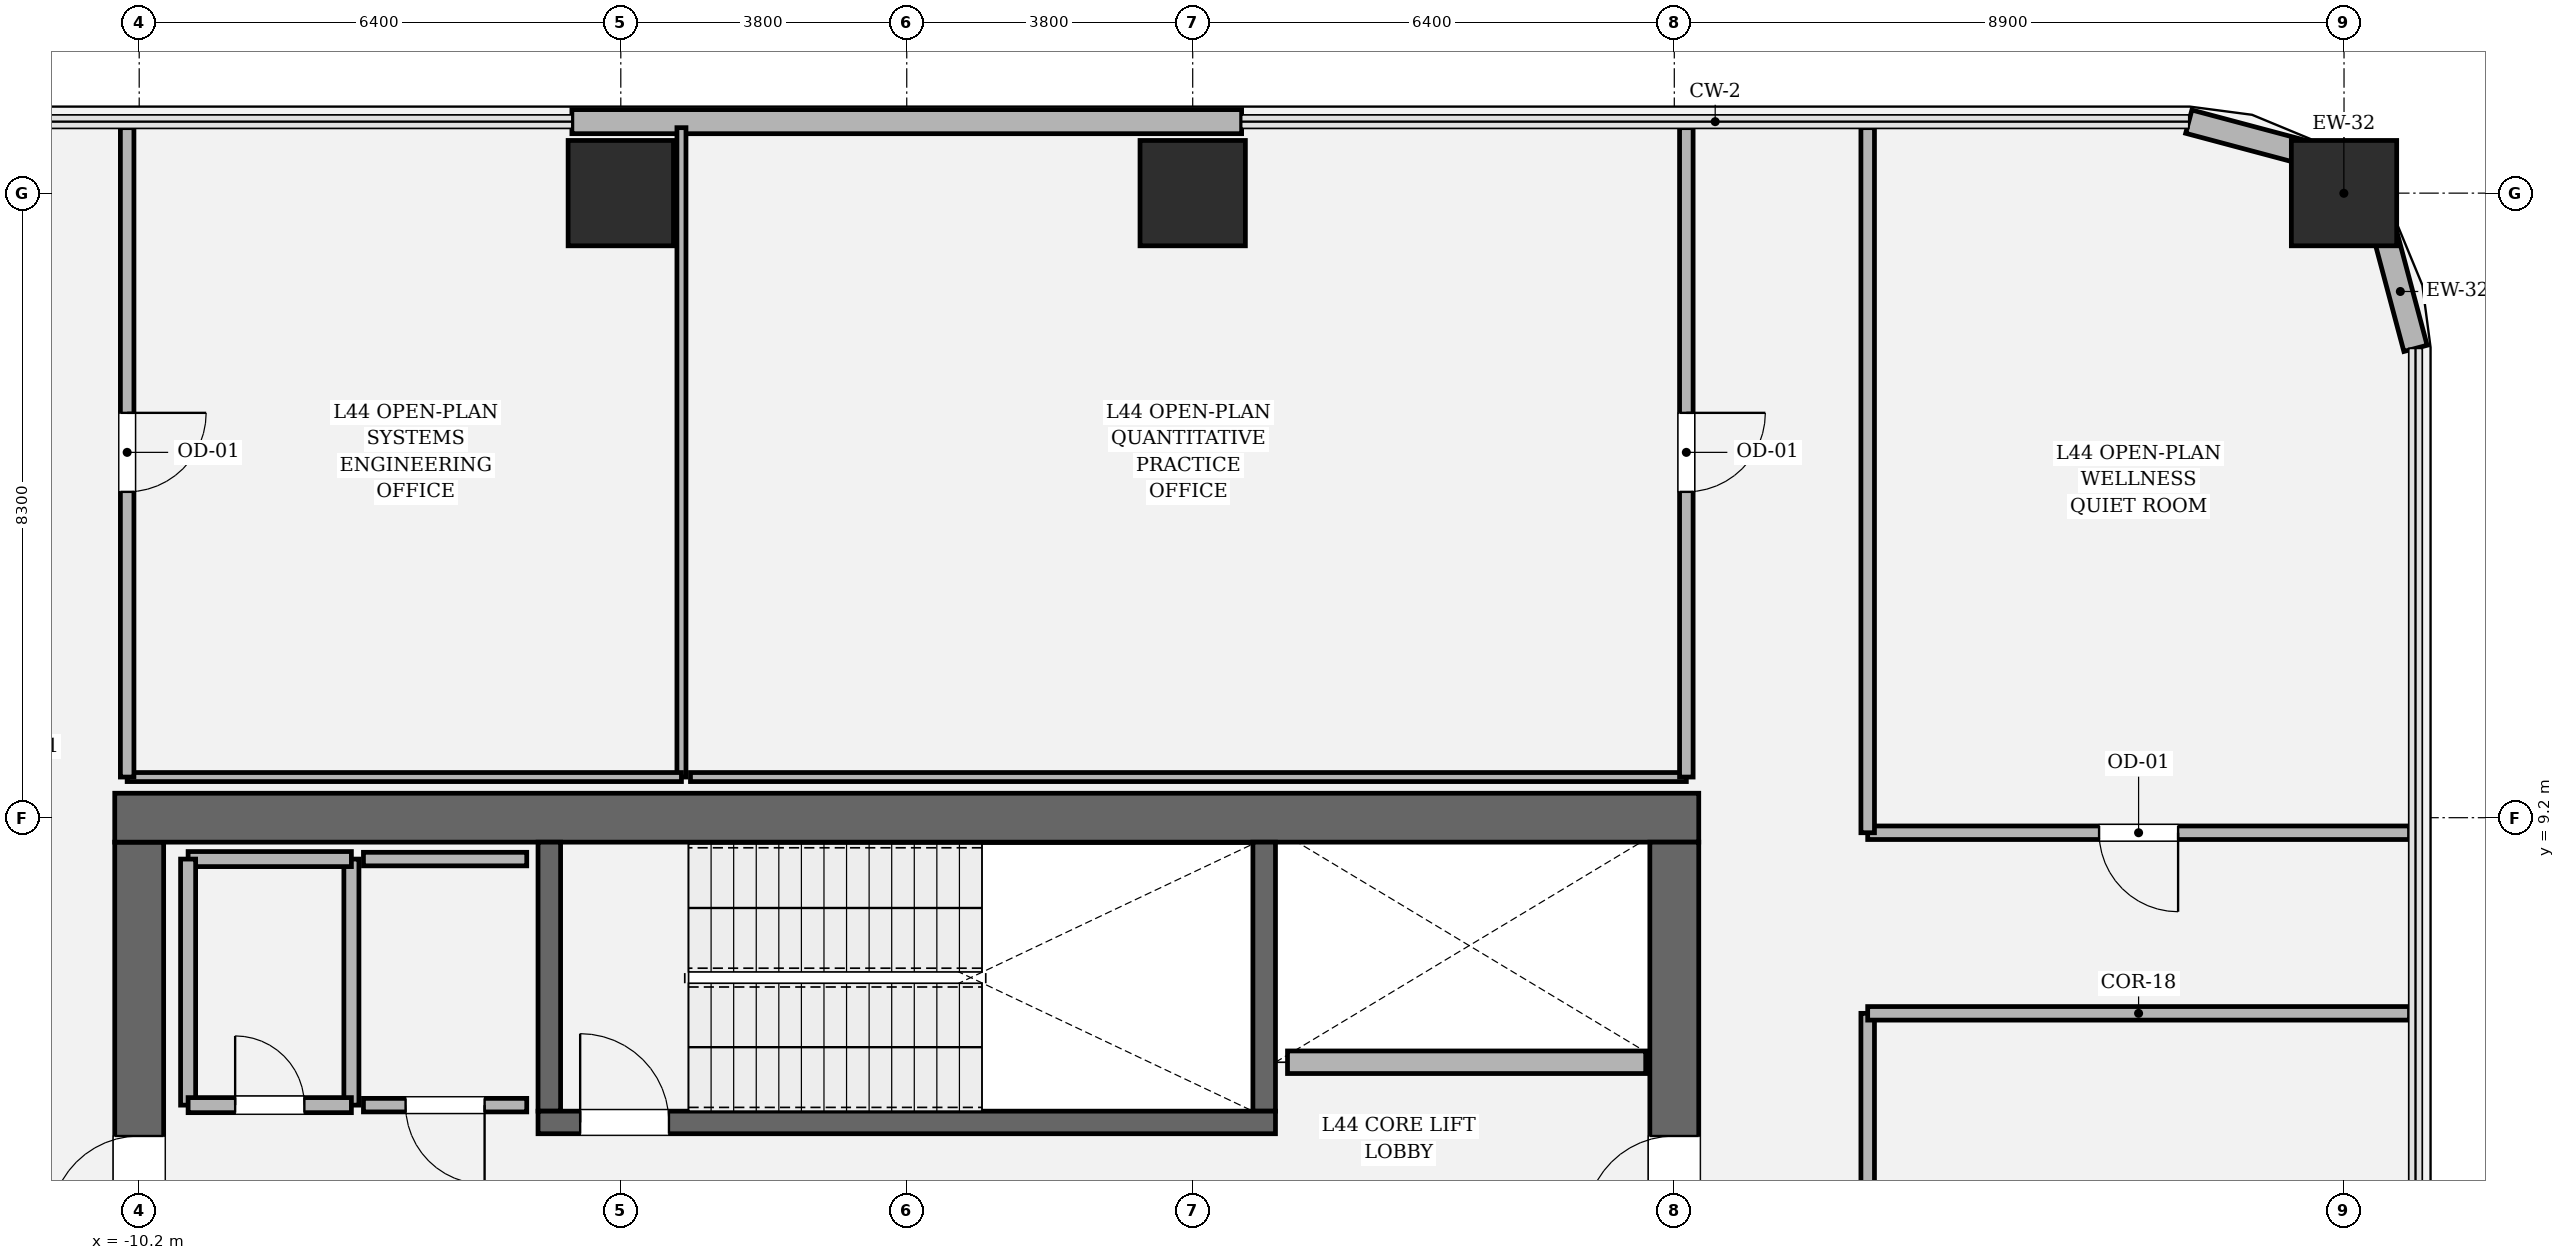
"""IFC4 building model, lengths in metres.
Left out: names, types, materials, properties, quantities, classifications, styles, units other than length and angle.
Written with IfcOpenShell. Run it as: python <this file> out.ifc"""

import sys

from ifc_helpers import new_model, si_unit, direction, frame, frame_2d, origin, origin_2d, place, context, subcontext, project, spatial, rectangle, hollow_rectangle, extrude, element, fill, save


model = new_model("IFC4")
c1 = context("Model", 3, precision=1e-05, world=origin(), true_north=direction((0.0, 1.0)))
c2 = subcontext(c1, "Body", "Model", "MODEL_VIEW")
j1 = project(units=[si_unit("LENGTHUNIT", "METRE"), si_unit("PLANEANGLEUNIT", "RADIAN")], contexts=[c1])
p1 = place(None, origin())
s1 = spatial("IfcSite", under=j1, at=p1, CompositionType="ELEMENT")
p2 = place(p1, origin())
s2 = spatial("IfcBuilding", under=s1, at=p2, CompositionType="ELEMENT")
p3 = place(p2, frame((0.0, 0.0, 188.4)))
s3 = spatial("IfcBuildingStorey", under=s2, at=p3, CompositionType="ELEMENT", Elevation=188.4)
p4 = place(p3, frame((-10.2, -8.875, 0.0), z_axis=(0.0, 0.0, 1.0), x_axis=(0.0, 1.0, 0.0)))
e1 = element("IfcWall", 1, at=p4, inside=s3, PredefinedType="SHEAR", context=c2, shape_type="SweptSolid", body=[
    extrude(rectangle(XDim=17.75, YDim=0.65, at=frame_2d((8.875, 0.0))), origin(), (0.0, 0.0, 1.0), 4.05),
])
p5 = place(p4, frame((12.665, 0.0, 0.0)))
e2 = element("IfcOpeningElement", 2, at=p5, cuts=e1, PredefinedType="OPENING", context=c2, shape_type="SweptSolid", body=[
    extrude(rectangle(XDim=1.18, YDim=2.2, at=frame_2d((0.59, 1.1))), frame((0.0, 0.335, 0.0), z_axis=(0.0, -1.0, 0.0), x_axis=(1.0, 0.0, 0.0)), (0.0, 0.0, 1.0), 0.67),
])
p6 = place(p3, frame((-10.525, 9.2, 0.0), z_axis=(0.0, 0.0, 1.0), x_axis=(1.0, 0.0, 0.0)))
e3 = element("IfcWall", 3, at=p6, inside=s3, PredefinedType="SHEAR", context=c2, shape_type="SweptSolid", body=[
    extrude(rectangle(XDim=21.05, YDim=0.65, at=frame_2d((10.525, 0.0))), origin(), (0.0, 0.0, 1.0), 4.05),
])
p7 = place(p3, frame((10.2, 8.875, 0.0), z_axis=(0.0, 0.0, 1.0), x_axis=(0.0, -1.0, 0.0)))
e4 = element("IfcWall", 4, at=p7, inside=s3, PredefinedType="SHEAR", context=c2, shape_type="SweptSolid", body=[
    extrude(rectangle(XDim=17.75, YDim=0.65, at=frame_2d((8.875, 0.0))), origin(), (0.0, 0.0, 1.0), 4.05),
])
p8 = place(p7, frame((3.905, 0.0, 0.0)))
e5 = element("IfcOpeningElement", 5, at=p8, cuts=e4, PredefinedType="OPENING", context=c2, shape_type="SweptSolid", body=[
    extrude(rectangle(XDim=1.18, YDim=2.2, at=frame_2d((0.59, 1.1))), frame((0.0, 0.335, 0.0), z_axis=(0.0, -1.0, 0.0), x_axis=(1.0, 0.0, 0.0)), (0.0, 0.0, 1.0), 0.67),
])
for number, where, z_axis, x_axis in (
    (6, (-4.75, 5.3, 0.0), (0.0, 0.0, 1.0), (0.0, 1.0, 0.0)),
    (7, (4.75, 8.875, 0.0), (0.0, 0.0, 1.0), (0.0, -1.0, 0.0)),
):
    element("IfcWall", number, at=place(p3, frame(where, z_axis=z_axis, x_axis=x_axis)), inside=s3, PredefinedType="SOLIDWALL", context=c2, shape_type="SweptSolid", body=[
        extrude(rectangle(XDim=3.575, YDim=0.3, at=frame_2d((1.788, 0.0))), origin(), (0.0, 0.0, 1.0), 4.05),
    ])
p9 = place(p3, frame((-4.9, 5.15, 0.0), z_axis=(0.0, 0.0, 1.0), x_axis=(1.0, 0.0, 0.0)))
e8 = element("IfcWall", 8, at=p9, inside=s3, PredefinedType="SOLIDWALL", context=c2, shape_type="SweptSolid", body=[
    extrude(rectangle(XDim=9.8, YDim=0.3, at=frame_2d((4.9, 0.0))), origin(), (0.0, 0.0, 1.0), 4.05),
])
p10 = place(p9, frame((0.56, 0.0, 0.0)))
e9 = element("IfcOpeningElement", 9, at=p10, cuts=e8, PredefinedType="OPENING", context=c2, shape_type="SweptSolid", body=[
    extrude(rectangle(XDim=1.18, YDim=2.2, at=frame_2d((0.59, 1.1))), frame((0.0, 0.16, 0.0), z_axis=(0.0, -1.0, 0.0), x_axis=(1.0, 0.0, 0.0)), (0.0, 0.0, 1.0), 0.32),
])
for number, where, z_axis, x_axis in (
    (10, (19.1, 17.5, 0.0), (0.0, 0.0, 1.0), (1.0, 0.0, 0.0)),
    (11, (3.8, 17.5, 0.0), (0.0, 0.0, 1.0), (1.0, 0.0, 0.0)),
    (12, (-3.8, 17.5, 0.0), (0.0, 0.0, 1.0), (1.0, 0.0, 0.0)),
):
    element("IfcColumn", number, at=place(p3, frame(where, z_axis=z_axis, x_axis=x_axis)), inside=s3, PredefinedType="COLUMN", context=c2, shape_type="SweptSolid", body=[
        extrude(hollow_rectangle(XDim=1.4, YDim=1.4, WallThickness=0.042, at=origin_2d()), origin(), (0.0, 0.0, 1.0), 4.05),
    ])
p11 = place(p3, frame((20.05, 15.437, 0.0), z_axis=(0.0, 0.0, 1.0), x_axis=(-0.257847112249, 0.966185730957, 0.0)))
e13 = element("IfcWall", 13, at=p11, inside=s3, PredefinedType="SOLIDWALL", context=c2, shape_type="SweptSolid", body=[
    extrude(rectangle(XDim=1.565, YDim=0.32, at=frame_2d((0.783, 0.0))), origin(), (0.0, 0.0, 1.0), 3.83),
])
p12 = place(p3, frame((19.646, 16.949, 0.0), z_axis=(0.0, 0.0, 1.0), x_axis=(-0.707106781187, 0.707106781187, 0.0)))
e14 = element("IfcWall", 14, at=p12, inside=s3, PredefinedType="SOLIDWALL", context=c2, shape_type="SweptSolid", body=[
    extrude(rectangle(XDim=1.552, YDim=0.32, at=frame_2d((0.776, 0.0))), origin(), (0.0, 0.0, 1.0), 3.174),
])
p13 = place(p3, frame((18.549, 18.047, 0.0), z_axis=(0.0, 0.0, 1.0), x_axis=(-0.966224582397, 0.257701486942, 0.0)))
e15 = element("IfcWall", 15, at=p13, inside=s3, PredefinedType="SOLIDWALL", context=c2, shape_type="SweptSolid", body=[
    extrude(rectangle(XDim=1.565, YDim=0.32, at=frame_2d((0.783, 0.0))), origin(), (0.0, 0.0, 1.0), 3.83),
])
p14 = place(p3, frame((4.45, 18.45, 0.0), z_axis=(0.0, 0.0, 1.0), x_axis=(-1.0, 0.0, 0.0)))
e16 = element("IfcWall", 16, at=p14, inside=s3, PredefinedType="SOLIDWALL", context=c2, shape_type="SweptSolid", body=[
    extrude(rectangle(XDim=8.9, YDim=0.32, at=frame_2d((4.45, 0.0))), origin(), (0.0, 0.0, 1.0), 3.83),
])
p15 = place(p3, frame((5.06, 5.95, 0.0), z_axis=(0.0, 0.0, 1.0), x_axis=(1.0, 0.0, 0.0)))
e17 = element("IfcWall", 17, at=p15, inside=s3, PredefinedType="SOLIDWALL", context=c2, shape_type="SweptSolid", body=[
    extrude(rectangle(XDim=4.76, YDim=0.3, at=frame_2d((2.38, 0.0))), origin(), (0.0, 0.0, 1.0), 3.83),
])
p16 = place(p3, frame((-7.38, 5.38, 0.0), z_axis=(0.0, 0.0, 1.0), x_axis=(0.0, 1.0, 0.0)))
e18 = element("IfcWall", 18, at=p16, inside=s3, PredefinedType="SOLIDWALL", context=c2, shape_type="SweptSolid", body=[
    extrude(rectangle(XDim=3.27, YDim=0.2, at=frame_2d((1.635, 0.0))), origin(), (0.0, 0.0, 1.0), 3.83),
])
p17 = place(p3, frame((-7.38, 8.65, 0.0), z_axis=(0.0, 0.0, 1.0), x_axis=(-1.0, 0.0, 0.0)))
e19 = element("IfcWall", 19, at=p17, inside=s3, PredefinedType="SOLIDWALL", context=c2, shape_type="SweptSolid", body=[
    extrude(rectangle(XDim=2.17, YDim=0.2, at=frame_2d((1.085, 0.0))), origin(), (0.0, 0.0, 1.0), 3.83),
])
p18 = place(p3, frame((-9.55, 8.65, 0.0), z_axis=(0.0, 0.0, 1.0), x_axis=(0.0, -1.0, 0.0)))
e20 = element("IfcWall", 20, at=p18, inside=s3, PredefinedType="SOLIDWALL", context=c2, shape_type="SweptSolid", body=[
    extrude(rectangle(XDim=3.27, YDim=0.2, at=frame_2d((1.635, 0.0))), origin(), (0.0, 0.0, 1.0), 3.83),
])
p19 = place(p3, frame((-9.55, 5.38, 0.0), z_axis=(0.0, 0.0, 1.0), x_axis=(1.0, 0.0, 0.0)))
e21 = element("IfcWall", 21, at=p19, inside=s3, PredefinedType="SOLIDWALL", context=c2, shape_type="SweptSolid", body=[
    extrude(rectangle(XDim=2.17, YDim=0.2, at=frame_2d((1.085, 0.0))), origin(), (0.0, 0.0, 1.0), 3.83),
])
p20 = place(p19, frame((0.625, 0.0, 0.0)))
e22 = element("IfcOpeningElement", 22, at=p20, cuts=e21, PredefinedType="OPENING", context=c2, shape_type="SweptSolid", body=[
    extrude(rectangle(XDim=0.92, YDim=2.1, at=frame_2d((0.46, 1.05))), frame((0.0, 0.11, 0.0), z_axis=(0.0, -1.0, 0.0), x_axis=(1.0, 0.0, 0.0)), (0.0, 0.0, 1.0), 0.22),
])
p21 = place(p3, frame((-5.05, 8.65, 0.0), z_axis=(0.0, 0.0, 1.0), x_axis=(-1.0, 0.0, 0.0)))
e23 = element("IfcWall", 23, at=p21, inside=s3, PredefinedType="PARTITIONING", context=c2, shape_type="SweptSolid", body=[
    extrude(rectangle(XDim=2.17, YDim=0.18, at=frame_2d((1.085, 0.0))), origin(), (0.0, 0.0, 1.0), 3.83),
])
p22 = place(p3, frame((-7.22, 5.38, 0.0), z_axis=(0.0, 0.0, 1.0), x_axis=(1.0, 0.0, 0.0)))
e24 = element("IfcWall", 24, at=p22, inside=s3, PredefinedType="PARTITIONING", context=c2, shape_type="SweptSolid", body=[
    extrude(rectangle(XDim=2.17, YDim=0.18, at=frame_2d((1.085, 0.0))), origin(), (0.0, 0.0, 1.0), 3.83),
])
p23 = place(p22, frame((0.56, 0.0, 0.0)))
e25 = element("IfcOpeningElement", 25, at=p23, cuts=e24, PredefinedType="OPENING", context=c2, shape_type="SweptSolid", body=[
    extrude(rectangle(XDim=1.05, YDim=2.2, at=frame_2d((0.525, 1.1))), frame((0.0, 0.1, 0.0), z_axis=(0.0, -1.0, 0.0), x_axis=(1.0, 0.0, 0.0)), (0.0, 0.0, 1.0), 0.2),
])
p24 = place(p3, frame((12.77, -11.77, 0.0), z_axis=(0.0, 0.0, 1.0), x_axis=(0.0, 1.0, 0.0)))
e26 = element("IfcWall", 26, at=p24, inside=s3, PredefinedType="PARTITIONING", context=c2, shape_type="SweptSolid", body=[
    extrude(rectangle(XDim=18.37, YDim=0.18, at=frame_2d((9.185, 0.0))), origin(), (0.0, 0.0, 1.0), 3.174),
])
p25 = place(p24, frame((8.485, 0.0, 0.0)))
e27 = element("IfcOpeningElement", 27, at=p25, cuts=e26, PredefinedType="OPENING", context=c2, shape_type="SweptSolid", body=[
    extrude(rectangle(XDim=1.4, YDim=2.25, at=frame_2d((0.7, 1.125))), frame((0.0, 0.1, 0.0), z_axis=(0.0, -1.0, 0.0), x_axis=(1.0, 0.0, 0.0)), (0.0, 0.0, 1.0), 0.2),
])
p26 = place(p3, frame((12.77, 6.6, 0.0), z_axis=(0.0, 0.0, 1.0), x_axis=(1.0, 0.0, 0.0)))
e28 = element("IfcWall", 28, at=p26, inside=s3, PredefinedType="PARTITIONING", context=c2, shape_type="SweptSolid", body=[
    extrude(rectangle(XDim=7.2, YDim=0.18, at=frame_2d((3.6, 0.0))), origin(), (0.0, 0.0, 1.0), 3.174),
])
p27 = place(p3, frame((19.97, 9.0, 0.0), z_axis=(0.0, 0.0, 1.0), x_axis=(-1.0, 0.0, 0.0)))
e29 = element("IfcWall", 29, at=p27, inside=s3, PredefinedType="PARTITIONING", context=c2, shape_type="SweptSolid", body=[
    extrude(rectangle(XDim=7.2, YDim=0.18, at=frame_2d((3.6, 0.0))), origin(), (0.0, 0.0, 1.0), 3.174),
])
p28 = place(p27, frame((3.075, 0.0, 0.0)))
e30 = element("IfcOpeningElement", 30, at=p28, cuts=e29, PredefinedType="OPENING", context=c2, shape_type="SweptSolid", body=[
    extrude(rectangle(XDim=1.05, YDim=2.2, at=frame_2d((0.525, 1.1))), frame((0.0, 0.1, 0.0), z_axis=(0.0, -1.0, 0.0), x_axis=(1.0, 0.0, 0.0)), (0.0, 0.0, 1.0), 0.2),
])
p29 = place(p3, frame((12.77, 9.0, 0.0), z_axis=(0.0, 0.0, 1.0), x_axis=(0.0, 1.0, 0.0)))
e31 = element("IfcWall", 31, at=p29, inside=s3, PredefinedType="PARTITIONING", context=c2, shape_type="SweptSolid", body=[
    extrude(rectangle(XDim=9.37, YDim=0.18, at=frame_2d((4.685, 0.0))), origin(), (0.0, 0.0, 1.0), 3.174),
])
p30 = place(p3, frame((-2.994, 18.37, 0.0), z_axis=(0.0, 0.0, 1.0), x_axis=(0.0, -1.0, 0.0)))
e32 = element("IfcWall", 32, at=p30, inside=s3, PredefinedType="PARTITIONING", context=c2, shape_type="SweptSolid", body=[
    extrude(rectangle(XDim=8.63, YDim=0.12, at=frame_2d((4.315, 0.0))), origin(), (0.0, 0.0, 1.0), 3.174),
])
p31 = place(p3, frame((-2.994, 9.74, 0.0), z_axis=(0.0, 0.0, 1.0), x_axis=(-1.0, 0.0, 0.0)))
e33 = element("IfcWall", 33, at=p31, inside=s3, PredefinedType="PARTITIONING", context=c2, shape_type="SweptSolid", body=[
    extrude(rectangle(XDim=7.366, YDim=0.12, at=frame_2d((3.683, 0.0))), origin(), (0.0, 0.0, 1.0), 3.174),
])
p32 = place(p3, frame((-10.36, 9.74, 0.0), z_axis=(0.0, 0.0, 1.0), x_axis=(0.0, 1.0, 0.0)))
e34 = element("IfcWall", 34, at=p32, inside=s3, PredefinedType="PARTITIONING", context=c2, shape_type="SweptSolid", body=[
    extrude(rectangle(XDim=8.63, YDim=0.18, at=frame_2d((4.315, 0.0))), origin(), (0.0, 0.0, 1.0), 3.174),
])
p33 = place(p32, frame((3.79, 0.0, 0.0)))
e35 = element("IfcOpeningElement", 35, at=p33, cuts=e34, PredefinedType="OPENING", context=c2, shape_type="SweptSolid", body=[
    extrude(rectangle(XDim=1.05, YDim=2.2, at=frame_2d((0.525, 1.1))), frame((0.0, 0.1, 0.0), z_axis=(0.0, -1.0, 0.0), x_axis=(1.0, 0.0, 0.0)), (0.0, 0.0, 1.0), 0.2),
])
p34 = place(p3, frame((10.36, 9.74, 0.0), z_axis=(0.0, 0.0, 1.0), x_axis=(-1.0, 0.0, 0.0)))
e36 = element("IfcWall", 36, at=p34, inside=s3, PredefinedType="PARTITIONING", context=c2, shape_type="SweptSolid", body=[
    extrude(rectangle(XDim=13.234, YDim=0.12, at=frame_2d((6.617, 0.0))), origin(), (0.0, 0.0, 1.0), 3.174),
])
p35 = place(p3, frame((10.36, 18.37, 0.0), z_axis=(0.0, 0.0, 1.0), x_axis=(0.0, -1.0, 0.0)))
e37 = element("IfcWall", 37, at=p35, inside=s3, PredefinedType="PARTITIONING", context=c2, shape_type="SweptSolid", body=[
    extrude(rectangle(XDim=8.63, YDim=0.18, at=frame_2d((4.315, 0.0))), origin(), (0.0, 0.0, 1.0), 3.174),
])
p36 = place(p35, frame((3.79, 0.0, 0.0)))
e38 = element("IfcOpeningElement", 38, at=p36, cuts=e37, PredefinedType="OPENING", context=c2, shape_type="SweptSolid", body=[
    extrude(rectangle(XDim=1.05, YDim=2.2, at=frame_2d((0.525, 1.1))), frame((0.0, 0.1, 0.0), z_axis=(0.0, -1.0, 0.0), x_axis=(1.0, 0.0, 0.0)), (0.0, 0.0, 1.0), 0.2),
])
p37 = place(p10, origin())
e39 = element("IfcDoor", 39, at=p37, inside=s3, OperationType="SINGLE_SWING_LEFT", PredefinedType="DOOR", context=c2, shape_type="SweptSolid", body=[
    extrude(rectangle(XDim=1.18, YDim=2.2, at=frame_2d((0.59, 1.1))), frame((0.0, 0.025, 0.0), z_axis=(0.0, -1.0, 0.0), x_axis=(1.0, 0.0, 0.0)), (0.0, 0.0, 1.0), 0.05),
])
fill(e9, e39)
p38 = place(p5, origin())
e40 = element("IfcDoor", 40, at=p38, inside=s3, OperationType="SINGLE_SWING_LEFT", PredefinedType="DOOR", context=c2, shape_type="SweptSolid", body=[
    extrude(rectangle(XDim=1.18, YDim=2.2, at=frame_2d((0.59, 1.1))), frame((0.0, 0.025, 0.0), z_axis=(0.0, -1.0, 0.0), x_axis=(1.0, 0.0, 0.0)), (0.0, 0.0, 1.0), 0.05),
])
fill(e2, e40)
p39 = place(p8, origin())
e41 = element("IfcDoor", 41, at=p39, inside=s3, OperationType="SINGLE_SWING_RIGHT", PredefinedType="DOOR", context=c2, shape_type="SweptSolid", body=[
    extrude(rectangle(XDim=1.18, YDim=2.2, at=frame_2d((0.59, 1.1))), frame((0.0, 0.025, 0.0), z_axis=(0.0, -1.0, 0.0), x_axis=(1.0, 0.0, 0.0)), (0.0, 0.0, 1.0), 0.05),
])
fill(e5, e41)
p40 = place(p20, origin())
e42 = element("IfcDoor", 42, at=p40, inside=s3, OperationType="SINGLE_SWING_LEFT", PredefinedType="DOOR", context=c2, shape_type="SweptSolid", body=[
    extrude(rectangle(XDim=0.92, YDim=2.1, at=frame_2d((0.46, 1.05))), frame((0.0, 0.025, 0.0), z_axis=(0.0, -1.0, 0.0), x_axis=(1.0, 0.0, 0.0)), (0.0, 0.0, 1.0), 0.05),
])
fill(e22, e42)
p41 = place(p23, origin())
e43 = element("IfcDoor", 43, at=p41, inside=s3, OperationType="SINGLE_SWING_RIGHT", PredefinedType="DOOR", context=c2, shape_type="SweptSolid", body=[
    extrude(rectangle(XDim=1.05, YDim=2.2, at=frame_2d((0.525, 1.1))), frame((0.0, 0.025, 0.0), z_axis=(0.0, -1.0, 0.0), x_axis=(1.0, 0.0, 0.0)), (0.0, 0.0, 1.0), 0.05),
])
fill(e25, e43)
p42 = place(p28, origin())
e44 = element("IfcDoor", 44, at=p42, inside=s3, OperationType="SINGLE_SWING_LEFT", PredefinedType="DOOR", context=c2, shape_type="SweptSolid", body=[
    extrude(rectangle(XDim=1.05, YDim=2.2, at=frame_2d((0.525, 1.1))), frame((0.0, 0.025, 0.0), z_axis=(0.0, -1.0, 0.0), x_axis=(1.0, 0.0, 0.0)), (0.0, 0.0, 1.0), 0.05),
])
fill(e30, e44)
p43 = place(p33, origin())
e45 = element("IfcDoor", 45, at=p43, inside=s3, OperationType="SINGLE_SWING_RIGHT", PredefinedType="DOOR", context=c2, shape_type="SweptSolid", body=[
    extrude(rectangle(XDim=1.05, YDim=2.2, at=frame_2d((0.525, 1.1))), frame((0.0, 0.025, 0.0), z_axis=(0.0, -1.0, 0.0), x_axis=(1.0, 0.0, 0.0)), (0.0, 0.0, 1.0), 0.05),
])
fill(e35, e45)
p44 = place(p36, origin())
e46 = element("IfcDoor", 46, at=p44, inside=s3, OperationType="SINGLE_SWING_LEFT", PredefinedType="DOOR", context=c2, shape_type="SweptSolid", body=[
    extrude(rectangle(XDim=1.05, YDim=2.2, at=frame_2d((0.525, 1.1))), frame((0.0, 0.025, 0.0), z_axis=(0.0, -1.0, 0.0), x_axis=(1.0, 0.0, 0.0)), (0.0, 0.0, 1.0), 0.05),
])
fill(e38, e46)
save(model, sys.argv[1])
